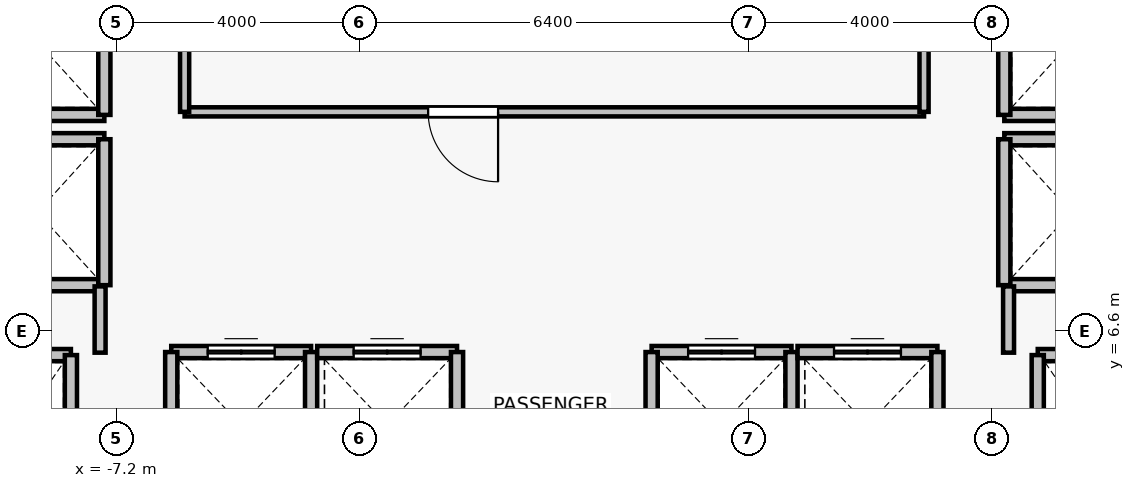
"""IFC4 building model, lengths in metres.
Left out: names, types, materials, properties, quantities, classifications, styles, units other than length and angle.
Written with IfcOpenShell. Run it as: python <this file> out.ifc"""

import sys

from ifc_helpers import new_model, si_unit, direction, frame, frame_2d, origin, place, context, subcontext, project, spatial, rectangle, extrude, source, transform, mapped, element, fill, save


model = new_model("IFC4")
c1 = context("Model", 3, precision=1e-05, world=origin(), true_north=direction((0.0, 1.0)))
c2 = subcontext(c1, "Body", "Model", "MODEL_VIEW")
j1 = project(units=[si_unit("LENGTHUNIT", "METRE"), si_unit("PLANEANGLEUNIT", "RADIAN")], contexts=[c1])
p1 = place(None, origin())
s1 = spatial("IfcSite", under=j1, at=p1, CompositionType="ELEMENT")
p2 = place(p1, origin())
s2 = spatial("IfcBuilding", under=s1, at=p2, CompositionType="ELEMENT")
p3 = place(p2, frame((0.0, 0.0, 189.1)))
s3 = spatial("IfcBuildingStorey", under=s2, at=p3, CompositionType="ELEMENT", Elevation=189.1)
p4 = place(p3, frame((-9.95, 6.2, 0.0), z_axis=(0.0, 0.0, 1.0), x_axis=(1.0, 0.0, 0.0)))
e1 = element("IfcWall", 1, at=p4, inside=s3, PredefinedType="SOLIDWALL", context=c2, shape_type="SweptSolid", body=[
    extrude(rectangle(XDim=2.0, YDim=0.2, at=frame_2d((1.0, 0.0))), origin(), (0.0, 0.0, 1.0), 3.075),
])
p5 = place(p3, frame((-7.95, 6.2, 0.0), z_axis=(0.0, 0.0, 1.0), x_axis=(0.0, -1.0, 0.0)))
e2 = element("IfcWall", 2, at=p5, inside=s3, PredefinedType="SOLIDWALL", context=c2, shape_type="SweptSolid", body=[
    extrude(rectangle(XDim=2.8, YDim=0.2, at=frame_2d((1.4, 0.0))), origin(), (0.0, 0.0, 1.0), 3.075),
])
p6 = place(p3, frame((7.95, 6.2, 0.0), z_axis=(0.0, 0.0, 1.0), x_axis=(1.0, 0.0, 0.0)))
e3 = element("IfcWall", 3, at=p6, inside=s3, PredefinedType="SOLIDWALL", context=c2, shape_type="SweptSolid", body=[
    extrude(rectangle(XDim=2.0, YDim=0.2, at=frame_2d((1.0, 0.0))), origin(), (0.0, 0.0, 1.0), 3.075),
])
p7 = place(p3, frame((7.95, 3.4, 0.0), z_axis=(0.0, 0.0, 1.0), x_axis=(0.0, 1.0, 0.0)))
e4 = element("IfcWall", 4, at=p7, inside=s3, PredefinedType="SOLIDWALL", context=c2, shape_type="SweptSolid", body=[
    extrude(rectangle(XDim=2.8, YDim=0.2, at=frame_2d((1.4, 0.0))), origin(), (0.0, 0.0, 1.0), 3.075),
])
p8 = place(p3, frame((-6.3, 6.25, 0.0), z_axis=(0.0, 0.0, 1.0), x_axis=(1.0, 0.0, 0.0)))
e5 = element("IfcWall", 5, at=p8, inside=s3, PredefinedType="SOLIDWALL", context=c2, shape_type="SweptSolid", body=[
    extrude(rectangle(XDim=2.3, YDim=0.2, at=frame_2d((1.15, 0.0))), origin(), (0.0, 0.0, 1.0), 3.075),
])
p9 = place(p8, frame((0.6, 0.0, 0.0)))
e6 = element("IfcOpeningElement", 6, at=p9, cuts=e5, PredefinedType="OPENING", context=c2, shape_type="SweptSolid", body=[
    extrude(rectangle(XDim=1.1, YDim=2.2, at=frame_2d((0.55, 1.1))), frame((0.0, 0.11, 0.0), z_axis=(0.0, -1.0, 0.0), x_axis=(1.0, 0.0, 0.0)), (0.0, 0.0, 1.0), 0.22),
])
for number, where, z_axis, x_axis in (
    (7, (-6.3, 3.85, 0.0), (0.0, 0.0, 1.0), (0.0, 1.0, 0.0)),
    (8, (-4.0, 6.25, 0.0), (0.0, 0.0, 1.0), (0.0, -1.0, 0.0)),
):
    element("IfcWall", number, at=place(p3, frame(where, z_axis=z_axis, x_axis=x_axis)), inside=s3, PredefinedType="SOLIDWALL", context=c2, shape_type="SweptSolid", body=[
        extrude(rectangle(XDim=2.4, YDim=0.2, at=frame_2d((1.2, 0.0))), origin(), (0.0, 0.0, 1.0), 3.075),
    ])
p10 = place(p3, frame((-3.9, 6.25, 0.0), z_axis=(0.0, 0.0, 1.0), x_axis=(1.0, 0.0, 0.0)))
e9 = element("IfcWall", 9, at=p10, inside=s3, PredefinedType="SOLIDWALL", context=c2, shape_type="SweptSolid", body=[
    extrude(rectangle(XDim=2.3, YDim=0.2, at=frame_2d((1.15, 0.0))), origin(), (0.0, 0.0, 1.0), 3.075),
])
p11 = place(p10, frame((0.6, 0.0, 0.0)))
e10 = element("IfcOpeningElement", 10, at=p11, cuts=e9, PredefinedType="OPENING", context=c2, shape_type="SweptSolid", body=[
    extrude(rectangle(XDim=1.1, YDim=2.2, at=frame_2d((0.55, 1.1))), frame((0.0, 0.11, 0.0), z_axis=(0.0, -1.0, 0.0), x_axis=(1.0, 0.0, 0.0)), (0.0, 0.0, 1.0), 0.22),
])
p12 = place(p3, frame((-1.6, 6.25, 0.0), z_axis=(0.0, 0.0, 1.0), x_axis=(0.0, -1.0, 0.0)))
e11 = element("IfcWall", 11, at=p12, inside=s3, PredefinedType="SOLIDWALL", context=c2, shape_type="SweptSolid", body=[
    extrude(rectangle(XDim=2.4, YDim=0.2, at=frame_2d((1.2, 0.0))), origin(), (0.0, 0.0, 1.0), 3.075),
])
p13 = place(p3, frame((1.6, 6.25, 0.0), z_axis=(0.0, 0.0, 1.0), x_axis=(1.0, 0.0, 0.0)))
e12 = element("IfcWall", 12, at=p13, inside=s3, PredefinedType="SOLIDWALL", context=c2, shape_type="SweptSolid", body=[
    extrude(rectangle(XDim=2.3, YDim=0.2, at=frame_2d((1.15, 0.0))), origin(), (0.0, 0.0, 1.0), 3.075),
])
p14 = place(p13, frame((0.6, 0.0, 0.0)))
e13 = element("IfcOpeningElement", 13, at=p14, cuts=e12, PredefinedType="OPENING", context=c2, shape_type="SweptSolid", body=[
    extrude(rectangle(XDim=1.1, YDim=2.2, at=frame_2d((0.55, 1.1))), frame((0.0, 0.11, 0.0), z_axis=(0.0, -1.0, 0.0), x_axis=(1.0, 0.0, 0.0)), (0.0, 0.0, 1.0), 0.22),
])
for number, where, z_axis, x_axis in (
    (14, (1.6, 3.85, 0.0), (0.0, 0.0, 1.0), (0.0, 1.0, 0.0)),
    (15, (3.9, 6.25, 0.0), (0.0, 0.0, 1.0), (0.0, -1.0, 0.0)),
):
    element("IfcWall", number, at=place(p3, frame(where, z_axis=z_axis, x_axis=x_axis)), inside=s3, PredefinedType="SOLIDWALL", context=c2, shape_type="SweptSolid", body=[
        extrude(rectangle(XDim=2.4, YDim=0.2, at=frame_2d((1.2, 0.0))), origin(), (0.0, 0.0, 1.0), 3.075),
    ])
p15 = place(p3, frame((4.0, 6.25, 0.0), z_axis=(0.0, 0.0, 1.0), x_axis=(1.0, 0.0, 0.0)))
e16 = element("IfcWall", 16, at=p15, inside=s3, PredefinedType="SOLIDWALL", context=c2, shape_type="SweptSolid", body=[
    extrude(rectangle(XDim=2.3, YDim=0.2, at=frame_2d((1.15, 0.0))), origin(), (0.0, 0.0, 1.0), 3.075),
])
p16 = place(p15, frame((0.6, 0.0, 0.0)))
e17 = element("IfcOpeningElement", 17, at=p16, cuts=e16, PredefinedType="OPENING", context=c2, shape_type="SweptSolid", body=[
    extrude(rectangle(XDim=1.1, YDim=2.2, at=frame_2d((0.55, 1.1))), frame((0.0, 0.11, 0.0), z_axis=(0.0, -1.0, 0.0), x_axis=(1.0, 0.0, 0.0)), (0.0, 0.0, 1.0), 0.22),
])
p17 = place(p3, frame((6.3, 6.25, 0.0), z_axis=(0.0, 0.0, 1.0), x_axis=(0.0, -1.0, 0.0)))
e18 = element("IfcWall", 18, at=p17, inside=s3, PredefinedType="SOLIDWALL", context=c2, shape_type="SweptSolid", body=[
    extrude(rectangle(XDim=2.4, YDim=0.2, at=frame_2d((1.2, 0.0))), origin(), (0.0, 0.0, 1.0), 3.075),
])
for number, where, z_axis, x_axis in (
    (19, (-7.4, 7.35, 0.0), (0.0, 0.0, 1.0), (-1.0, 0.0, 0.0)),
    (20, (-9.6, 9.75, 0.0), (0.0, 0.0, 1.0), (1.0, 0.0, 0.0)),
):
    element("IfcWall", number, at=place(p3, frame(where, z_axis=z_axis, x_axis=x_axis)), inside=s3, PredefinedType="SOLIDWALL", context=c2, shape_type="SweptSolid", body=[
        extrude(rectangle(XDim=2.2, YDim=0.2, at=frame_2d((1.1, 0.0))), origin(), (0.0, 0.0, 1.0), 2.565),
    ])
p18 = place(p3, frame((-7.4, 9.75, 0.0), z_axis=(0.0, 0.0, 1.0), x_axis=(0.0, -1.0, 0.0)))
e21 = element("IfcWall", 21, at=p18, inside=s3, PredefinedType="SOLIDWALL", context=c2, shape_type="SweptSolid", body=[
    extrude(rectangle(XDim=2.4, YDim=0.2, at=frame_2d((1.2, 0.0))), origin(), (0.0, 0.0, 1.0), 2.565),
])
p19 = place(p3, frame((-7.4, 10.15, 0.0), z_axis=(0.0, 0.0, 1.0), x_axis=(-1.0, 0.0, 0.0)))
e22 = element("IfcWall", 22, at=p19, inside=s3, PredefinedType="SOLIDWALL", context=c2, shape_type="SweptSolid", body=[
    extrude(rectangle(XDim=2.2, YDim=0.2, at=frame_2d((1.1, 0.0))), origin(), (0.0, 0.0, 1.0), 2.565),
])
p20 = place(p3, frame((-7.4, 12.55, 0.0), z_axis=(0.0, 0.0, 1.0), x_axis=(0.0, -1.0, 0.0)))
e23 = element("IfcWall", 23, at=p20, inside=s3, PredefinedType="SOLIDWALL", context=c2, shape_type="SweptSolid", body=[
    extrude(rectangle(XDim=2.4, YDim=0.2, at=frame_2d((1.2, 0.0))), origin(), (0.0, 0.0, 1.0), 2.565),
])
for number, where, z_axis, x_axis in (
    (24, (9.6, 7.35, 0.0), (0.0, 0.0, 1.0), (-1.0, 0.0, 0.0)),
    (25, (7.4, 9.75, 0.0), (0.0, 0.0, 1.0), (1.0, 0.0, 0.0)),
):
    element("IfcWall", number, at=place(p3, frame(where, z_axis=z_axis, x_axis=x_axis)), inside=s3, PredefinedType="SOLIDWALL", context=c2, shape_type="SweptSolid", body=[
        extrude(rectangle(XDim=2.2, YDim=0.2, at=frame_2d((1.1, 0.0))), origin(), (0.0, 0.0, 1.0), 2.565),
    ])
p21 = place(p3, frame((7.4, 7.35, 0.0), z_axis=(0.0, 0.0, 1.0), x_axis=(0.0, 1.0, 0.0)))
e26 = element("IfcWall", 26, at=p21, inside=s3, PredefinedType="SOLIDWALL", context=c2, shape_type="SweptSolid", body=[
    extrude(rectangle(XDim=2.4, YDim=0.2, at=frame_2d((1.2, 0.0))), origin(), (0.0, 0.0, 1.0), 2.565),
])
p22 = place(p3, frame((9.6, 10.15, 0.0), z_axis=(0.0, 0.0, 1.0), x_axis=(-1.0, 0.0, 0.0)))
e27 = element("IfcWall", 27, at=p22, inside=s3, PredefinedType="SOLIDWALL", context=c2, shape_type="SweptSolid", body=[
    extrude(rectangle(XDim=2.2, YDim=0.2, at=frame_2d((1.1, 0.0))), origin(), (0.0, 0.0, 1.0), 2.565),
])
p23 = place(p3, frame((7.4, 10.15, 0.0), z_axis=(0.0, 0.0, 1.0), x_axis=(0.0, 1.0, 0.0)))
e28 = element("IfcWall", 28, at=p23, inside=s3, PredefinedType="SOLIDWALL", context=c2, shape_type="SweptSolid", body=[
    extrude(rectangle(XDim=2.4, YDim=0.2, at=frame_2d((1.2, 0.0))), origin(), (0.0, 0.0, 1.0), 2.565),
])
for number, where, z_axis, x_axis in (
    (29, (-7.47, 7.33, 0.0), (0.0, 0.0, 1.0), (0.0, -1.0, 0.0)),
    (30, (7.47, 6.24, 0.0), (0.0, 0.0, 1.0), (0.0, 1.0, 0.0)),
):
    element("IfcWall", number, at=place(p3, frame(where, z_axis=z_axis, x_axis=x_axis)), inside=s3, PredefinedType="PARTITIONING", context=c2, shape_type="SweptSolid", body=[
        extrude(rectangle(XDim=1.09, YDim=0.18, at=frame_2d((0.545, 0.0))), origin(), (0.0, 0.0, 1.0), 2.565),
    ])
p24 = place(p3, frame((6.08, 10.2, 0.0), z_axis=(0.0, 0.0, 1.0), x_axis=(-1.0, 0.0, 0.0)))
e31 = element("IfcWall", 31, at=p24, inside=s3, PredefinedType="PARTITIONING", context=c2, shape_type="SweptSolid", body=[
    extrude(rectangle(XDim=12.16, YDim=0.15, at=frame_2d((6.08, 0.0))), origin(), (0.0, 0.0, 1.0), 3.075),
])
p25 = place(p24, frame((7.005, 0.0, 0.0)))
e32 = element("IfcOpeningElement", 32, at=p25, cuts=e31, PredefinedType="OPENING", context=c2, shape_type="SweptSolid", body=[
    extrude(rectangle(XDim=1.15, YDim=2.15, at=frame_2d((0.575, 1.075))), frame((0.0, 0.085, 0.0), z_axis=(0.0, -1.0, 0.0), x_axis=(1.0, 0.0, 0.0)), (0.0, 0.0, 1.0), 0.17),
])
for number, where, z_axis, x_axis in (
    (33, (-6.08, 10.2, 0.0), (0.0, 0.0, 1.0), (0.0, 1.0, 0.0)),
    (34, (6.08, 13.0, 0.0), (0.0, 0.0, 1.0), (0.0, -1.0, 0.0)),
):
    element("IfcWall", number, at=place(p3, frame(where, z_axis=z_axis, x_axis=x_axis)), inside=s3, PredefinedType="PARTITIONING", context=c2, shape_type="SweptSolid", body=[
        extrude(rectangle(XDim=2.8, YDim=0.15, at=frame_2d((1.4, 0.0))), origin(), (0.0, 0.0, 1.0), 3.075),
    ])
m1 = source(origin(), c2, "Body", "SweptSolid", [
    extrude(rectangle(XDim=1.1, YDim=2.2, at=frame_2d((0.55, 1.1))), frame((0.0, 0.025, 0.0), z_axis=(0.0, -1.0, 0.0), x_axis=(1.0, 0.0, 0.0)), (0.0, 0.0, 1.0), 0.05),
])
p26 = place(p9, origin())
e35 = element("IfcDoor", 35, at=p26, inside=s3, OperationType="DOUBLE_DOOR_SLIDING", PredefinedType="DOOR", context=c2, shape_type="MappedRepresentation", body=[
    mapped(m1, transform((0.0, 0.0, 0.0), x_axis=(1.0, 0.0, 0.0), y_axis=(0.0, 1.0, 0.0), z_axis=(0.0, 0.0, 1.0), scale=1.0)),
])
fill(e6, e35)
p27 = place(p11, origin())
e36 = element("IfcDoor", 36, at=p27, inside=s3, OperationType="DOUBLE_DOOR_SLIDING", PredefinedType="DOOR", context=c2, shape_type="MappedRepresentation", body=[
    mapped(m1, transform((0.0, 0.0, 0.0), x_axis=(1.0, 0.0, 0.0), y_axis=(0.0, 1.0, 0.0), z_axis=(0.0, 0.0, 1.0), scale=1.0)),
])
fill(e10, e36)
p28 = place(p14, origin())
e37 = element("IfcDoor", 37, at=p28, inside=s3, OperationType="DOUBLE_DOOR_SLIDING", PredefinedType="DOOR", context=c2, shape_type="MappedRepresentation", body=[
    mapped(m1, transform((0.0, 0.0, 0.0), x_axis=(1.0, 0.0, 0.0), y_axis=(0.0, 1.0, 0.0), z_axis=(0.0, 0.0, 1.0), scale=1.0)),
])
fill(e13, e37)
p29 = place(p16, origin())
e38 = element("IfcDoor", 38, at=p29, inside=s3, OperationType="DOUBLE_DOOR_SLIDING", PredefinedType="DOOR", context=c2, shape_type="MappedRepresentation", body=[
    mapped(m1, transform((0.0, 0.0, 0.0), x_axis=(1.0, 0.0, 0.0), y_axis=(0.0, 1.0, 0.0), z_axis=(0.0, 0.0, 1.0), scale=1.0)),
])
fill(e17, e38)
m2 = source(origin(), c2, "Body", "SweptSolid", [
    extrude(rectangle(XDim=1.15, YDim=2.15, at=frame_2d((0.575, 1.075))), frame((0.0, 0.025, 0.0), z_axis=(0.0, -1.0, 0.0), x_axis=(1.0, 0.0, 0.0)), (0.0, 0.0, 1.0), 0.05),
])
p30 = place(p25, origin())
e39 = element("IfcDoor", 39, at=p30, inside=s3, OperationType="SINGLE_SWING_LEFT", PredefinedType="DOOR", context=c2, shape_type="MappedRepresentation", body=[
    mapped(m2, transform((0.0, 0.0, 0.0), x_axis=(1.0, 0.0, 0.0), y_axis=(0.0, 1.0, 0.0), z_axis=(0.0, 0.0, 1.0), scale=1.0)),
])
fill(e32, e39)
save(model, sys.argv[1])
